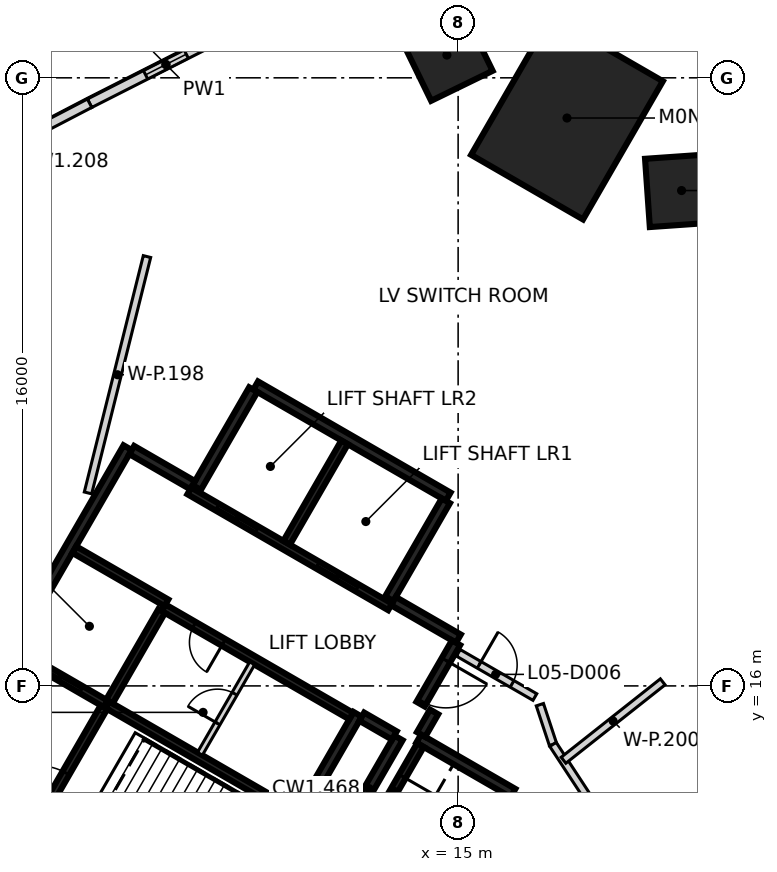
"""IFC4 building model, lengths in metres.
Left out: names, types, materials, properties, quantities, classifications, styles, units other than length and angle.
Written with IfcOpenShell. Run it as: python <this file> out.ifc"""

import sys

from ifc_helpers import new_model, si_unit, direction, frame, frame_2d, origin, origin_2d, place, context, subcontext, project, spatial, polyline, rectangle, outline, extrude, element, fill, save


model = new_model("IFC4")
c1 = context("Model", 3, precision=1e-05, world=origin(), true_north=direction((0.0, 1.0)))
c2 = subcontext(c1, "Body", "Model", "MODEL_VIEW")
j1 = project(units=[si_unit("LENGTHUNIT", "METRE"), si_unit("PLANEANGLEUNIT", "RADIAN")], contexts=[c1])
p1 = place(None, origin())
s1 = spatial("IfcSite", under=j1, at=p1, CompositionType="ELEMENT")
p2 = place(p1, origin())
s2 = spatial("IfcBuilding", under=s1, at=p2, CompositionType="ELEMENT")
p3 = place(p2, frame((0.0, 0.0, 29.5)))
s3 = spatial("IfcBuildingStorey", under=s2, at=p3, CompositionType="ELEMENT", Elevation=29.5)
p4 = place(p3, frame((17.865, 30.942, -0.4), z_axis=(0.0, 0.0, 1.0), x_axis=(0.5, 0.866025403784, 0.0)))
e1 = element("IfcColumn", 1, at=p4, inside=s3, PredefinedType="COLUMN", context=c2, shape_type="SweptSolid", body=[
    extrude(rectangle(XDim=4.2, YDim=3.4, at=origin_2d()), origin(), (0.0, 0.0, 1.0), 5.425),
])
for number, where, z_axis, x_axis in (
    (2, (20.879, 29.034, -0.4), (0.0, 0.0, 1.0), (0.998, 0.07, 0.0)),
    (3, (14.705, 32.599, -0.4), (0.0, 0.0, 1.0), (-0.438, 0.899, 0.0)),
):
    element("IfcColumn", number, at=place(p3, frame(where, z_axis=z_axis, x_axis=x_axis)), inside=s3, PredefinedType="COLUMN", context=c2, shape_type="SweptSolid", body=[
        extrude(rectangle(XDim=1.8, YDim=1.8, at=origin_2d()), origin(), (0.0, 0.0, 1.0), 3.025),
    ])
p5 = place(p3, frame((5.302, 31.33, 0.0), z_axis=(0.0, 0.0, 1.0), x_axis=(0.891778772779, 0.452471679136, 0.0)))
e4 = element("IfcWall", 4, at=p5, inside=s3, PredefinedType="SOLIDWALL", context=c2, shape_type="SweptSolid", body=[
    extrude(rectangle(XDim=4.507, YDim=0.25, at=frame_2d((2.253, 0.0))), origin(), (0.0, 0.0, 1.0), 5.025),
])
p6 = place(p5, frame((1.653, 0.0, 2.4)))
e5 = element("IfcOpeningElement", 5, at=p6, cuts=e4, PredefinedType="OPENING", context=c2, shape_type="SweptSolid", body=[
    extrude(rectangle(XDim=1.2, YDim=0.9, at=frame_2d((0.6, 0.45))), frame((0.0, 0.135, 0.0), z_axis=(0.0, -1.0, 0.0), x_axis=(1.0, 0.0, 0.0)), (0.0, 0.0, 1.0), 0.27),
])
p7 = place(p3, frame((1.309, 29.25, 0.0), z_axis=(0.0, 0.0, 1.0), x_axis=(0.886844679975, 0.462067650458, 0.0)))
e6 = element("IfcWall", 6, at=p7, inside=s3, PredefinedType="SOLIDWALL", context=c2, shape_type="SweptSolid", body=[
    extrude(rectangle(XDim=4.504, YDim=0.25, at=frame_2d((2.252, 0.0))), origin(), (0.0, 0.0, 1.0), 5.025),
])
p8 = place(p3, origin())
e7 = element("IfcWall", 7, at=p8, inside=s3, PredefinedType="SOLIDWALL", context=c2, shape_type="SweptSolid", body=[
    extrude(outline(polyline([(24.071, 29.257), (22.95, 32.708), (20.339, 35.229), (16.851, 36.229), (13.302, 35.475), (13.354, 35.23), (16.842, 35.972), (20.211, 35.006), (22.731, 32.572), (23.833, 29.18), (24.071, 29.257)])), origin(), (0.0, 0.0, 1.0), 5.025),
])
p9 = place(p3, frame((-2.034, 29.91, 0.0), z_axis=(0.0, 0.0, 1.0), x_axis=(0.865868993684, 0.500270812437, 0.0)))
e8 = element("IfcWall", 8, at=p9, inside=s3, PredefinedType="PARAPET", context=c2, shape_type="SweptSolid", body=[
    extrude(rectangle(XDim=8.992, YDim=0.15, at=frame_2d((4.496, 0.0))), origin(), (0.0, 0.0, 1.0), 1.1),
])
p10 = place(p3, frame((3.179, 16.856, 0.0), z_axis=(0.0, 0.0, 1.0), x_axis=(0.500004234368, 0.866022959057, 0.0)))
e9 = element("IfcWall", 9, at=p10, inside=s3, PredefinedType="SHEAR", context=c2, shape_type="SweptSolid", body=[
    extrude(rectangle(XDim=6.25, YDim=0.25, at=frame_2d((3.125, 0.0))), origin(), (0.0, 0.0, 1.0), 5.025),
])
p11 = place(p3, frame((9.673, 23.903, 0.0), z_axis=(0.0, 0.0, 1.0), x_axis=(0.86603616409, -0.499981362141, 0.0)))
e10 = element("IfcWall", 10, at=p11, inside=s3, PredefinedType="SHEAR", context=c2, shape_type="SweptSolid", body=[
    extrude(rectangle(XDim=5.85, YDim=0.25, at=frame_2d((2.925, 0.0))), origin(), (0.0, 0.0, 1.0), 5.025),
])
p12 = place(p3, frame((12.357, 15.252, 0.0), z_axis=(0.0, 0.0, 1.0), x_axis=(-0.500028443584, -0.866008981251, 0.0)))
e11 = element("IfcWall", 11, at=p12, inside=s3, PredefinedType="SHEAR", context=c2, shape_type="SweptSolid", body=[
    extrude(rectangle(XDim=3.2, YDim=0.25, at=frame_2d((1.6, 0.0))), origin(), (0.0, 0.0, 1.0), 5.025),
])
for number, where, z_axis, x_axis in (
    (12, (8.123, 21.219, 0.0), (0.0, 0.0, 1.0), (0.5, 0.866, 0.0)),
    (13, (14.676, 20.87, 0.0), (0.0, 0.0, 1.0), (-0.5, -0.866, 0.0)),
):
    element("IfcWall", number, at=place(p3, frame(where, z_axis=z_axis, x_axis=x_axis)), inside=s3, PredefinedType="SHEAR", context=c2, shape_type="SweptSolid", body=[
        extrude(rectangle(XDim=2.975, YDim=0.25, at=frame_2d((1.487, 0.0))), origin(), (0.0, 0.0, 1.0), 5.025),
    ])
p13 = place(p3, frame((13.963, 14.614, 0.0), z_axis=(0.0, 0.0, 1.0), x_axis=(0.866042235819, -0.499970844928, 0.0)))
e14 = element("IfcWall", 14, at=p13, inside=s3, PredefinedType="SHEAR", context=c2, shape_type="SweptSolid", body=[
    extrude(rectangle(XDim=2.865, YDim=0.25, at=frame_2d((1.432, 0.0))), origin(), (0.0, 0.0, 1.0), 5.025),
])
p14 = place(p3, frame((11.888, 11.961, 0.0), z_axis=(0.0, 0.0, 1.0), x_axis=(0.500003324108, 0.866023484601, 0.0)))
e15 = element("IfcWall", 15, at=p14, inside=s3, PredefinedType="SHEAR", context=c2, shape_type="SweptSolid", body=[
    extrude(rectangle(XDim=3.085, YDim=0.25, at=frame_2d((1.542, 0.0))), origin(), (0.0, 0.0, 1.0), 5.025),
])
p15 = place(p3, frame((13.297, 18.231, 0.0), z_axis=(0.0, 0.0, 1.0), x_axis=(0.866043531843, -0.499968599967, 0.0)))
e16 = element("IfcWall", 16, at=p15, inside=s3, PredefinedType="SHEAR", context=c2, shape_type="SweptSolid", body=[
    extrude(rectangle(XDim=1.975, YDim=0.25, at=frame_2d((0.987, 0.0))), origin(), (0.0, 0.0, 1.0), 5.025),
])
p16 = place(p3, frame((6.413, 22.206, 0.0), z_axis=(0.0, 0.0, 1.0), x_axis=(0.866016279763, -0.500015802937, 0.0)))
e17 = element("IfcWall", 17, at=p16, inside=s3, PredefinedType="SHEAR", context=c2, shape_type="SweptSolid", body=[
    extrude(rectangle(XDim=1.849, YDim=0.25, at=frame_2d((0.925, 0.0))), origin(), (0.0, 0.0, 1.0), 5.025),
])
p17 = place(p3, frame((14.945, 17.135, 0.0), z_axis=(0.0, 0.0, 1.0), x_axis=(-0.499983108224, -0.866035156036, 0.0)))
e18 = element("IfcWall", 18, at=p17, inside=s3, PredefinedType="SHEAR", context=c2, shape_type="SweptSolid", body=[
    extrude(rectangle(XDim=1.865, YDim=0.25, at=frame_2d((0.932, 0.0))), origin(), (0.0, 0.0, 1.0), 5.025),
])
p18 = place(p17, frame((0.535, 0.0, 0.0)))
e19 = element("IfcOpeningElement", 19, at=p18, cuts=e18, PredefinedType="OPENING", context=c2, shape_type="SweptSolid", body=[
    extrude(rectangle(XDim=1.25, YDim=2.1, at=frame_2d((0.625, 1.05))), frame((0.0, 0.135, 0.0), z_axis=(0.0, -1.0, 0.0), x_axis=(1.0, 0.0, 0.0)), (0.0, 0.0, 1.0), 0.27),
])
p19 = place(p3, frame((13.322, 14.695, 0.0), z_axis=(0.0, 0.0, 1.0), x_axis=(-0.866017078145, 0.500014420154, 0.0)))
e20 = element("IfcWall", 20, at=p19, inside=s3, PredefinedType="SHEAR", context=c2, shape_type="SweptSolid", body=[
    extrude(rectangle(XDim=0.989, YDim=0.25, at=frame_2d((0.495, 0.0))), origin(), (0.0, 0.0, 1.0), 5.025),
])
p20 = place(p3, frame((14.368, 15.315, 0.0), z_axis=(0.0, 0.0, 1.0), x_axis=(-0.499897359611, -0.866084655132, 0.0)))
e21 = element("IfcWall", 21, at=p20, inside=s3, PredefinedType="SHEAR", context=c2, shape_type="SweptSolid", body=[
    extrude(rectangle(XDim=0.685, YDim=0.25, at=frame_2d((0.342, 0.0))), origin(), (0.0, 0.0, 1.0), 5.025),
])
p21 = place(p3, frame((13.21, 18.08, 0.0), z_axis=(0.0, 0.0, 1.0), x_axis=(-0.866030299012, 0.499991521122, 0.0)))
e22 = element("IfcWall", 22, at=p21, inside=s3, PredefinedType="SHEAR", context=c2, shape_type="SweptSolid", body=[
    extrude(rectangle(XDim=6.1, YDim=0.2, at=frame_2d((3.05, 0.0))), origin(), (0.0, 0.0, 1.0), 5.025),
])
p22 = place(p21, frame((1.0, 0.0, 0.0)))
e23 = element("IfcOpeningElement", 23, at=p22, cuts=e22, PredefinedType="OPENING", context=c2, shape_type="SweptSolid", body=[
    extrude(rectangle(XDim=1.2, YDim=2.1, at=frame_2d((0.6, 1.05))), frame((0.0, 0.11, 0.0), z_axis=(0.0, -1.0, 0.0), x_axis=(1.0, 0.0, 0.0)), (0.0, 0.0, 1.0), 0.22),
])
p23 = place(p21, frame((4.05, 0.0, 0.0)))
e24 = element("IfcOpeningElement", 24, at=p23, cuts=e22, PredefinedType="OPENING", context=c2, shape_type="SweptSolid", body=[
    extrude(rectangle(XDim=1.2, YDim=2.1, at=frame_2d((0.6, 1.05))), frame((0.0, 0.11, 0.0), z_axis=(0.0, -1.0, 0.0), x_axis=(1.0, 0.0, 0.0)), (0.0, 0.0, 1.0), 0.22),
])
p24 = place(p3, frame((5.775, 15.502, 0.0), z_axis=(0.0, 0.0, 1.0), x_axis=(0.866020080793, -0.500009219579, 0.0)))
e25 = element("IfcWall", 25, at=p24, inside=s3, PredefinedType="SHEAR", context=c2, shape_type="SweptSolid", body=[
    extrude(rectangle(XDim=5.699, YDim=0.2, at=frame_2d((2.85, 0.0))), origin(), (0.0, 0.0, 1.0), 5.025),
])
p25 = place(p3, frame((12.185, 15.207, 0.0), z_axis=(0.0, 0.0, 1.0), x_axis=(-0.866020080793, 0.500009219579, 0.0)))
e26 = element("IfcWall", 26, at=p25, inside=s3, PredefinedType="SHEAR", context=c2, shape_type="SweptSolid", body=[
    extrude(rectangle(XDim=5.699, YDim=0.2, at=frame_2d((2.85, 0.0))), origin(), (0.0, 0.0, 1.0), 5.025),
])
p26 = place(p25, frame((3.874, 0.0, 0.0)))
e27 = element("IfcOpeningElement", 27, at=p26, cuts=e26, PredefinedType="OPENING", context=c2, shape_type="SweptSolid", body=[
    extrude(rectangle(XDim=0.9, YDim=2.1, at=frame_2d((0.45, 1.05))), frame((0.0, 0.11, 0.0), z_axis=(0.0, -1.0, 0.0), x_axis=(1.0, 0.0, 0.0)), (0.0, 0.0, 1.0), 0.22),
])
p27 = place(p3, frame((3.057, 10.895, 0.0), z_axis=(0.0, 0.0, 1.0), x_axis=(0.499989418164, 0.866031513124, 0.0)))
e28 = element("IfcWall", 28, at=p27, inside=s3, PredefinedType="SHEAR", context=c2, shape_type="SweptSolid", body=[
    extrude(rectangle(XDim=5.251, YDim=0.2, at=frame_2d((2.625, 0.0))), origin(), (0.0, 0.0, 1.0), 5.025),
])
p28 = place(p27, frame((1.849, 0.0, 0.0)))
e29 = element("IfcOpeningElement", 29, at=p28, cuts=e28, PredefinedType="OPENING", context=c2, shape_type="SweptSolid", body=[
    extrude(rectangle(XDim=1.4, YDim=2.1, at=frame_2d((0.7, 1.05))), frame((0.0, 0.11, 0.0), z_axis=(0.0, -1.0, 0.0), x_axis=(1.0, 0.0, 0.0)), (0.0, 0.0, 1.0), 0.22),
])
p29 = place(p3, frame((10.489, 19.767, 0.0), z_axis=(0.0, 0.0, 1.0), x_axis=(0.499946628782, 0.866056215479, 0.0)))
e30 = element("IfcWall", 30, at=p29, inside=s3, PredefinedType="SHEAR", context=c2, shape_type="SweptSolid", body=[
    extrude(rectangle(XDim=3.048, YDim=0.2, at=frame_2d((1.524, 0.0))), origin(), (0.0, 0.0, 1.0), 5.025),
])
p30 = place(p3, frame((14.008, 14.442, 0.0), z_axis=(0.0, 0.0, 1.0), x_axis=(-0.499986818241, -0.866033014143, 0.0)))
e31 = element("IfcWall", 31, at=p30, inside=s3, PredefinedType="SHEAR", context=c2, shape_type="SweptSolid", body=[
    extrude(rectangle(XDim=2.798, YDim=0.2, at=frame_2d((1.399, 0.0))), origin(), (0.0, 0.0, 1.0), 5.025),
])
p31 = place(p30, frame((0.949, 0.0, 0.0)))
e32 = element("IfcOpeningElement", 32, at=p31, cuts=e31, PredefinedType="OPENING", context=c2, shape_type="SweptSolid", body=[
    extrude(rectangle(XDim=0.9, YDim=2.1, at=frame_2d((0.45, 1.05))), frame((0.0, 0.11, 0.0), z_axis=(0.0, -1.0, 0.0), x_axis=(1.0, 0.0, 0.0)), (0.0, 0.0, 1.0), 0.22),
])
p32 = place(p3, frame((7.199, 17.97, 0.0), z_axis=(0.0, 0.0, 1.0), x_axis=(-0.499968400327, -0.866043647095, 0.0)))
e33 = element("IfcWall", 33, at=p32, inside=s3, PredefinedType="SHEAR", context=c2, shape_type="SweptSolid", body=[
    extrude(rectangle(XDim=2.75, YDim=0.2, at=frame_2d((1.375, 0.0))), origin(), (0.0, 0.0, 1.0), 5.025),
])
p33 = place(p3, frame((5.725, 15.531, 0.0), z_axis=(0.0, 0.0, 1.0), x_axis=(-0.866037306777, 0.499979382845, 0.0)))
e34 = element("IfcWall", 34, at=p33, inside=s3, PredefinedType="SHEAR", context=c2, shape_type="SweptSolid", body=[
    extrude(rectangle(XDim=2.742, YDim=0.2, at=frame_2d((1.371, 0.0))), origin(), (0.0, 0.0, 1.0), 5.025),
])
p34 = place(p33, frame((0.743, 0.0, 0.0)))
e35 = element("IfcOpeningElement", 35, at=p34, cuts=e34, PredefinedType="OPENING", context=c2, shape_type="SweptSolid", body=[
    extrude(rectangle(XDim=1.3, YDim=2.1, at=frame_2d((0.65, 1.05))), frame((0.0, 0.11, 0.0), z_axis=(0.0, -1.0, 0.0), x_axis=(1.0, 0.0, 0.0)), (0.0, 0.0, 1.0), 0.22),
])
p35 = place(p3, frame((4.901, 19.586, 0.0), z_axis=(0.0, 0.0, 1.0), x_axis=(0.866022890907, -0.500004352405, 0.0)))
e36 = element("IfcWall", 36, at=p35, inside=s3, PredefinedType="SHEAR", context=c2, shape_type="SweptSolid", body=[
    extrude(rectangle(XDim=2.799, YDim=0.2, at=frame_2d((1.399, 0.0))), origin(), (0.0, 0.0, 1.0), 5.025),
])
p36 = place(p3, frame((8.207, 14.214, 0.0), z_axis=(0.0, 0.0, 1.0), x_axis=(0.499922376475, 0.866070215109, 0.0)))
e37 = element("IfcWall", 37, at=p36, inside=s3, PredefinedType="PARTITIONING", context=c2, shape_type="SweptSolid", body=[
    extrude(rectangle(XDim=2.749, YDim=0.15, at=frame_2d((1.374, 0.0))), origin(), (0.0, 0.0, 1.0), 5.025),
])
p37 = place(p36, frame((0.924, 0.0, 0.0)))
e38 = element("IfcOpeningElement", 38, at=p37, cuts=e37, PredefinedType="OPENING", context=c2, shape_type="SweptSolid", body=[
    extrude(rectangle(XDim=0.9, YDim=2.1, at=frame_2d((0.45, 1.05))), frame((0.0, 0.085, 0.0), z_axis=(0.0, -1.0, 0.0), x_axis=(1.0, 0.0, 0.0)), (0.0, 0.0, 1.0), 0.17),
])
p38 = place(p3, frame((15.005, 16.87, 0.0), z_axis=(0.0, 0.0, 1.0), x_axis=(0.866005508897, -0.500034457374, 0.0)))
e39 = element("IfcWall", 39, at=p38, inside=s3, PredefinedType="PARTITIONING", context=c2, shape_type="SweptSolid", body=[
    extrude(rectangle(XDim=2.325, YDim=0.2, at=frame_2d((1.163, 0.0))), origin(), (0.0, 0.0, 1.0), 5.025),
])
p39 = place(p38, frame((0.633, 0.0, 0.0)))
e40 = element("IfcOpeningElement", 40, at=p39, cuts=e39, PredefinedType="OPENING", context=c2, shape_type="SweptSolid", body=[
    extrude(rectangle(XDim=1.0, YDim=2.1, at=frame_2d((0.5, 1.05))), frame((0.0, 0.11, 0.0), z_axis=(0.0, -1.0, 0.0), x_axis=(1.0, 0.0, 0.0)), (0.0, 0.0, 1.0), 0.22),
])
p40 = place(p3, frame((17.151, 15.506, 0.0), z_axis=(0.0, 0.0, 1.0), x_axis=(0.313631470976, -0.949544785891, 0.0)))
e41 = element("IfcWall", 41, at=p40, inside=s3, PredefinedType="PARTITIONING", context=c2, shape_type="SweptSolid", body=[
    extrude(rectangle(XDim=1.101, YDim=0.2, at=frame_2d((0.55, 0.0))), origin(), (0.0, 0.0, 1.0), 5.025),
])
p41 = place(p3, frame((17.496, 14.461, 0.0), z_axis=(0.0, 0.0, 1.0), x_axis=(0.548472067288, -0.836168877324, 0.0)))
e42 = element("IfcWall", 42, at=p41, inside=s3, PredefinedType="PARTITIONING", context=c2, shape_type="SweptSolid", body=[
    extrude(rectangle(XDim=1.678, YDim=0.2, at=frame_2d((0.839, 0.0))), origin(), (0.0, 0.0, 1.0), 5.025),
])
p42 = place(p3, frame((5.261, 21.078, 0.0), z_axis=(0.0, 0.0, 1.0), x_axis=(0.242123360052, 0.97024547333, 0.0)))
e43 = element("IfcWall", 43, at=p42, inside=s3, PredefinedType="PARTITIONING", context=c2, shape_type="SweptSolid", body=[
    extrude(rectangle(XDim=6.41, YDim=0.2, at=frame_2d((3.205, 0.0))), origin(), (0.0, 0.0, 1.0), 5.025),
])
p43 = place(p3, frame((17.773, 14.044, 0.0), z_axis=(0.0, 0.0, 1.0), x_axis=(0.7845351384, 0.620084362499, 0.0)))
e44 = element("IfcWall", 44, at=p43, inside=s3, PredefinedType="PARTITIONING", context=c2, shape_type="SweptSolid", body=[
    extrude(rectangle(XDim=3.327, YDim=0.2, at=frame_2d((1.664, 0.0))), origin(), (0.0, 0.0, 1.0), 5.025),
])
p44 = place(p6, origin())
e45 = element("IfcWindow", 45, at=p44, inside=s3, PartitioningType="SINGLE_PANEL", PredefinedType="WINDOW", context=c2, shape_type="SweptSolid", body=[
    extrude(rectangle(XDim=1.2, YDim=0.9, at=frame_2d((0.6, 0.45))), frame((0.0, 0.03, 0.0), z_axis=(0.0, -1.0, 0.0), x_axis=(1.0, 0.0, 0.0)), (0.0, 0.0, 1.0), 0.06),
])
fill(e5, e45)
p45 = place(p34, origin())
e46 = element("IfcDoor", 46, at=p45, inside=s3, OperationType="SLIDING_TO_RIGHT", PredefinedType="DOOR", context=c2, shape_type="SweptSolid", body=[
    extrude(rectangle(XDim=1.3, YDim=2.1, at=frame_2d((0.65, 1.05))), frame((0.0, 0.025, 0.0), z_axis=(0.0, -1.0, 0.0), x_axis=(1.0, 0.0, 0.0)), (0.0, 0.0, 1.0), 0.05),
])
fill(e35, e46)
p46 = place(p22, origin())
e47 = element("IfcDoor", 47, at=p46, inside=s3, OperationType="DOUBLE_DOOR_SLIDING", PredefinedType="DOOR", context=c2, shape_type="SweptSolid", body=[
    extrude(rectangle(XDim=1.2, YDim=2.1, at=frame_2d((0.6, 1.05))), frame((0.0, 0.025, 0.0), z_axis=(0.0, -1.0, 0.0), x_axis=(1.0, 0.0, 0.0)), (0.0, 0.0, 1.0), 0.05),
])
fill(e23, e47)
p47 = place(p23, origin())
e48 = element("IfcDoor", 48, at=p47, inside=s3, OperationType="DOUBLE_DOOR_SLIDING", PredefinedType="DOOR", context=c2, shape_type="SweptSolid", body=[
    extrude(rectangle(XDim=1.2, YDim=2.1, at=frame_2d((0.6, 1.05))), frame((0.0, 0.025, 0.0), z_axis=(0.0, -1.0, 0.0), x_axis=(1.0, 0.0, 0.0)), (0.0, 0.0, 1.0), 0.05),
])
fill(e24, e48)
p48 = place(p18, origin())
e49 = element("IfcDoor", 49, at=p48, inside=s3, OperationType="SINGLE_SWING_LEFT", PredefinedType="DOOR", context=c2, shape_type="SweptSolid", body=[
    extrude(rectangle(XDim=1.25, YDim=2.1, at=frame_2d((0.625, 1.05))), frame((0.0, 0.025, 0.0), z_axis=(0.0, -1.0, 0.0), x_axis=(1.0, 0.0, 0.0)), (0.0, 0.0, 1.0), 0.05),
])
fill(e19, e49)
p49 = place(p28, origin())
e50 = element("IfcDoor", 50, at=p49, inside=s3, OperationType="SINGLE_SWING_RIGHT", PredefinedType="DOOR", context=c2, shape_type="SweptSolid", body=[
    extrude(rectangle(XDim=1.4, YDim=2.1, at=frame_2d((0.7, 1.05))), frame((0.0, 0.025, 0.0), z_axis=(0.0, -1.0, 0.0), x_axis=(1.0, 0.0, 0.0)), (0.0, 0.0, 1.0), 0.05),
])
fill(e29, e50)
p50 = place(p26, origin())
e51 = element("IfcDoor", 51, at=p50, inside=s3, OperationType="SINGLE_SWING_LEFT", PredefinedType="DOOR", context=c2, shape_type="SweptSolid", body=[
    extrude(rectangle(XDim=0.9, YDim=2.1, at=frame_2d((0.45, 1.05))), frame((0.0, 0.025, 0.0), z_axis=(0.0, -1.0, 0.0), x_axis=(1.0, 0.0, 0.0)), (0.0, 0.0, 1.0), 0.05),
])
fill(e27, e51)
p51 = place(p31, origin())
e52 = element("IfcDoor", 52, at=p51, inside=s3, OperationType="SINGLE_SWING_RIGHT", PredefinedType="DOOR", context=c2, shape_type="SweptSolid", body=[
    extrude(rectangle(XDim=0.9, YDim=2.1, at=frame_2d((0.45, 1.05))), frame((0.0, 0.025, 0.0), z_axis=(0.0, -1.0, 0.0), x_axis=(1.0, 0.0, 0.0)), (0.0, 0.0, 1.0), 0.05),
])
fill(e32, e52)
p52 = place(p37, origin())
e53 = element("IfcDoor", 53, at=p52, inside=s3, OperationType="SINGLE_SWING_LEFT", PredefinedType="DOOR", context=c2, shape_type="SweptSolid", body=[
    extrude(rectangle(XDim=0.9, YDim=2.1, at=frame_2d((0.45, 1.05))), frame((0.0, 0.025, 0.0), z_axis=(0.0, -1.0, 0.0), x_axis=(1.0, 0.0, 0.0)), (0.0, 0.0, 1.0), 0.05),
])
fill(e38, e53)
p53 = place(p39, origin())
e54 = element("IfcDoor", 54, at=p53, inside=s3, OperationType="SINGLE_SWING_LEFT", PredefinedType="DOOR", context=c2, shape_type="SweptSolid", body=[
    extrude(rectangle(XDim=1.0, YDim=2.1, at=frame_2d((0.5, 1.05))), frame((0.0, 0.025, 0.0), z_axis=(0.0, -1.0, 0.0), x_axis=(1.0, 0.0, 0.0)), (0.0, 0.0, 1.0), 0.05),
])
fill(e40, e54)
save(model, sys.argv[1])
